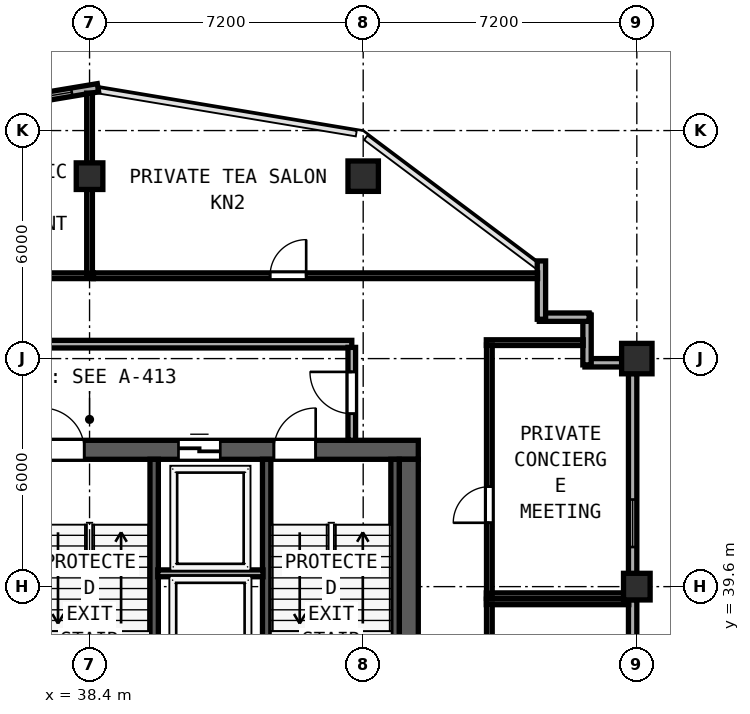
"""IFC4 building model, lengths in metres.
Left out: names, types, materials, properties, quantities, classifications, styles, units other than length and angle.
Written with IfcOpenShell. Run it as: python <this file> out.ifc"""

import sys

from ifc_helpers import new_model, si_unit, direction, frame, frame_2d, origin, origin_2d, place, context, subcontext, project, spatial, rectangle, hollow_rectangle, extrude, element, fill, save


model = new_model("IFC4")
c1 = context("Model", 3, precision=1e-05, world=origin(), true_north=direction((0.0, 1.0)))
c2 = subcontext(c1, "Body", "Model", "MODEL_VIEW")
j1 = project(units=[si_unit("LENGTHUNIT", "METRE"), si_unit("PLANEANGLEUNIT", "RADIAN")], contexts=[c1])
p1 = place(None, origin())
s1 = spatial("IfcSite", under=j1, at=p1, CompositionType="ELEMENT")
p2 = place(p1, origin())
s2 = spatial("IfcBuilding", under=s1, at=p2, CompositionType="ELEMENT")
p3 = place(p2, frame((0.0, 0.0, 246.75)))
s3 = spatial("IfcBuildingStorey", under=s2, at=p3, CompositionType="ELEMENT", Elevation=246.75)
p4 = place(p3, frame((29.75, 43.2, 0.0), z_axis=(0.0, 0.0, 1.0), x_axis=(1.0, 0.0, 0.0)))
e1 = element("IfcWall", 1, at=p4, inside=s3, PredefinedType="SHEAR", context=c2, shape_type="SweptSolid", body=[
    extrude(rectangle(XDim=17.3, YDim=0.5, at=frame_2d((8.65, 0.0))), origin(), (0.0, 0.0, 1.0), 3.67),
])
p5 = place(p4, frame((2.3, 0.0, 0.0)))
e2 = element("IfcOpeningElement", 2, at=p5, cuts=e1, PredefinedType="OPENING", context=c2, shape_type="SweptSolid", body=[
    extrude(rectangle(XDim=1.1, YDim=2.15, at=frame_2d((0.55, 1.075))), frame((0.0, 0.26, 0.0), z_axis=(0.0, -1.0, 0.0), x_axis=(1.0, 0.0, 0.0)), (0.0, 0.0, 1.0), 0.52),
])
p6 = place(p4, frame((7.41, 0.0, 0.0)))
e3 = element("IfcOpeningElement", 3, at=p6, cuts=e1, PredefinedType="OPENING", context=c2, shape_type="SweptSolid", body=[
    extrude(rectangle(XDim=1.1, YDim=2.15, at=frame_2d((0.55, 1.075))), frame((0.0, 0.26, 0.0), z_axis=(0.0, -1.0, 0.0), x_axis=(1.0, 0.0, 0.0)), (0.0, 0.0, 1.0), 0.52),
])
p7 = place(p4, frame((13.5, 0.0, 0.0)))
e4 = element("IfcOpeningElement", 4, at=p7, cuts=e1, PredefinedType="OPENING", context=c2, shape_type="SweptSolid", body=[
    extrude(rectangle(XDim=1.1, YDim=2.15, at=frame_2d((0.55, 1.075))), frame((0.0, 0.26, 0.0), z_axis=(0.0, -1.0, 0.0), x_axis=(1.0, 0.0, 0.0)), (0.0, 0.0, 1.0), 0.52),
])
p8 = place(p4, frame((4.63, 0.0, 0.0)))
e5 = element("IfcOpeningElement", 5, at=p8, cuts=e1, PredefinedType="OPENING", context=c2, shape_type="SweptSolid", body=[
    extrude(rectangle(XDim=1.1, YDim=2.2, at=frame_2d((0.55, 1.1))), frame((0.0, 0.26, 0.0), z_axis=(0.0, -1.0, 0.0), x_axis=(1.0, 0.0, 0.0)), (0.0, 0.0, 1.0), 0.52),
])
p9 = place(p4, frame((10.99, 0.0, 0.0)))
e6 = element("IfcOpeningElement", 6, at=p9, cuts=e1, PredefinedType="OPENING", context=c2, shape_type="SweptSolid", body=[
    extrude(rectangle(XDim=1.1, YDim=2.2, at=frame_2d((0.55, 1.1))), frame((0.0, 0.26, 0.0), z_axis=(0.0, -1.0, 0.0), x_axis=(1.0, 0.0, 0.0)), (0.0, 0.0, 1.0), 0.52),
])
p10 = place(p3, frame((46.8, 32.8, 0.0), z_axis=(0.0, 0.0, 1.0), x_axis=(0.0, 1.0, 0.0)))
e7 = element("IfcWall", 7, at=p10, inside=s3, PredefinedType="SHEAR", context=c2, shape_type="SweptSolid", body=[
    extrude(rectangle(XDim=10.15, YDim=0.5, at=frame_2d((5.075, 0.0))), origin(), (0.0, 0.0, 1.0), 3.67),
])
for number, where, z_axis, x_axis in (
    (8, (40.1, 35.39, 0.0), (0.0, 0.0, 1.0), (0.0, 1.0, 0.0)),
    (9, (43.06, 35.39, 0.0), (0.0, 0.0, 1.0), (0.0, 1.0, 0.0)),
    (10, (46.438, 35.39, 0.0), (0.0, 0.0, 1.0), (0.0, 1.0, 0.0)),
):
    element("IfcWall", number, at=place(p3, frame(where, z_axis=z_axis, x_axis=x_axis)), inside=s3, PredefinedType="SHEAR", context=c2, shape_type="SweptSolid", body=[
        extrude(rectangle(XDim=7.56, YDim=0.22, at=frame_2d((3.78, 0.0))), origin(), (0.0, 0.0, 1.0), 3.67),
    ])
for number, where, z_axis, x_axis in (
    (11, (52.8, 45.6, 0.0), (0.0, 0.0, 1.0), (1.0, 0.0, 0.0)),
    (12, (45.6, 50.4, 0.0), (0.0, 0.0, 1.0), (1.0, 0.0, 0.0)),
):
    element("IfcColumn", number, at=place(p3, frame(where, z_axis=z_axis, x_axis=x_axis)), inside=s3, PredefinedType="COLUMN", context=c2, shape_type="SweptSolid", body=[
        extrude(hollow_rectangle(XDim=0.8, YDim=0.8, WallThickness=0.03, at=origin_2d()), origin(), (0.0, 0.0, 1.0), 3.85),
    ])
for number, where, z_axis, x_axis in (
    (13, (52.8, 39.6, 0.0), (0.0, 0.0, 1.0), (1.0, 0.0, 0.0)),
    (14, (38.4, 50.4, 0.0), (0.0, 0.0, 1.0), (1.0, 0.0, 0.0)),
):
    element("IfcColumn", number, at=place(p3, frame(where, z_axis=z_axis, x_axis=x_axis)), inside=s3, PredefinedType="COLUMN", context=c2, shape_type="SweptSolid", body=[
        extrude(hollow_rectangle(XDim=0.7, YDim=0.7, WallThickness=0.026, at=origin_2d()), origin(), (0.0, 0.0, 1.0), 3.85),
    ])
p11 = place(p3, frame((52.69, 33.992, 0.0), z_axis=(0.0, 0.0, 1.0), x_axis=(0.0, 1.0, 0.0)))
e15 = element("IfcWall", 15, at=p11, inside=s3, PredefinedType="SOLIDWALL", context=c2, shape_type="SweptSolid", body=[
    extrude(rectangle(XDim=5.266, YDim=0.22, at=frame_2d((2.633, 0.0))), origin(), (0.0, 0.0, 1.0), 3.315),
])
p12 = place(p11, frame((0.7, 0.0, 0.85)))
e16 = element("IfcOpeningElement", 16, at=p12, cuts=e15, PredefinedType="OPENING", context=c2, shape_type="SweptSolid", body=[
    extrude(rectangle(XDim=1.25, YDim=1.95, at=frame_2d((0.625, 0.975))), frame((0.0, 0.12, 0.0), z_axis=(0.0, -1.0, 0.0), x_axis=(1.0, 0.0, 0.0)), (0.0, 0.0, 1.0), 0.24),
])
p13 = place(p3, frame((52.69, 39.942, 0.0), z_axis=(0.0, 0.0, 1.0), x_axis=(0.0, 1.0, 0.0)))
e17 = element("IfcWall", 17, at=p13, inside=s3, PredefinedType="SOLIDWALL", context=c2, shape_type="SweptSolid", body=[
    extrude(rectangle(XDim=5.266, YDim=0.22, at=frame_2d((2.633, 0.0))), origin(), (0.0, 0.0, 1.0), 3.315),
])
p14 = place(p13, frame((0.7, 0.0, 0.85)))
e18 = element("IfcOpeningElement", 18, at=p14, cuts=e17, PredefinedType="OPENING", context=c2, shape_type="SweptSolid", body=[
    extrude(rectangle(XDim=1.25, YDim=1.95, at=frame_2d((0.625, 0.975))), frame((0.0, 0.12, 0.0), z_axis=(0.0, -1.0, 0.0), x_axis=(1.0, 0.0, 0.0)), (0.0, 0.0, 1.0), 0.24),
])
p15 = place(p3, frame((52.408, 45.49, 0.0), z_axis=(0.0, 0.0, 1.0), x_axis=(-1.0, 0.0, 0.0)))
e19 = element("IfcWall", 19, at=p15, inside=s3, PredefinedType="SOLIDWALL", context=c2, shape_type="SweptSolid", body=[
    extrude(rectangle(XDim=0.973, YDim=0.22, at=frame_2d((0.486, 0.0))), origin(), (0.0, 0.0, 1.0), 3.67),
])
p16 = place(p3, frame((51.49, 45.435, 0.0), z_axis=(0.0, 0.0, 1.0), x_axis=(0.0, 1.0, 0.0)))
e20 = element("IfcWall", 20, at=p16, inside=s3, PredefinedType="SOLIDWALL", context=c2, shape_type="SweptSolid", body=[
    extrude(rectangle(XDim=1.31, YDim=0.22, at=frame_2d((0.655, 0.0))), origin(), (0.0, 0.0, 1.0), 3.67),
])
p17 = place(p3, frame((51.545, 46.69, 0.0), z_axis=(0.0, 0.0, 1.0), x_axis=(-1.0, 0.0, 0.0)))
e21 = element("IfcWall", 21, at=p17, inside=s3, PredefinedType="SOLIDWALL", context=c2, shape_type="SweptSolid", body=[
    extrude(rectangle(XDim=1.31, YDim=0.22, at=frame_2d((0.655, 0.0))), origin(), (0.0, 0.0, 1.0), 3.67),
])
p18 = place(p3, frame((50.29, 46.635, 0.0), z_axis=(0.0, 0.0, 1.0), x_axis=(0.0, 1.0, 0.0)))
e22 = element("IfcWall", 22, at=p18, inside=s3, PredefinedType="SOLIDWALL", context=c2, shape_type="SweptSolid", body=[
    extrude(rectangle(XDim=1.535, YDim=0.22, at=frame_2d((0.768, 0.0))), origin(), (0.0, 0.0, 1.0), 3.67),
])
p19 = place(p3, frame((38.622, 52.726, 0.0), z_axis=(0.0, 0.0, 1.0), x_axis=(-0.986390420428, -0.164420006349, 0.0)))
e23 = element("IfcWall", 23, at=p19, inside=s3, PredefinedType="SOLIDWALL", context=c2, shape_type="SweptSolid", body=[
    extrude(rectangle(XDim=7.534, YDim=0.22, at=frame_2d((3.767, 0.0))), origin(), (0.0, 0.0, 1.0), 3.67),
])
p20 = place(p19, frame((0.7, 0.0, 0.85)))
e24 = element("IfcOpeningElement", 24, at=p20, cuts=e23, PredefinedType="OPENING", context=c2, shape_type="SweptSolid", body=[
    extrude(rectangle(XDim=1.25, YDim=1.95, at=frame_2d((0.625, 0.975))), frame((0.0, 0.12, 0.0), z_axis=(0.0, -1.0, 0.0), x_axis=(1.0, 0.0, 0.0)), (0.0, 0.0, 1.0), 0.24),
])
p21 = place(p3, frame((31.5, 45.98, 0.0), z_axis=(0.0, 0.0, 1.0), x_axis=(1.0, 0.0, 0.0)))
e25 = element("IfcWall", 25, at=p21, inside=s3, PredefinedType="SOLIDWALL", context=c2, shape_type="SweptSolid", body=[
    extrude(rectangle(XDim=13.8, YDim=0.2, at=frame_2d((6.9, 0.0))), origin(), (0.0, 0.0, 1.0), 3.67),
])
p22 = place(p3, frame((45.3, 43.45, 0.0), z_axis=(0.0, 0.0, 1.0), x_axis=(0.0, 1.0, 0.0)))
e26 = element("IfcWall", 26, at=p22, inside=s3, PredefinedType="SOLIDWALL", context=c2, shape_type="SweptSolid", body=[
    extrude(rectangle(XDim=2.445, YDim=0.2, at=frame_2d((1.223, 0.0))), origin(), (0.0, 0.0, 1.0), 3.67),
])
p23 = place(p22, frame((0.7, 0.0, 0.0)))
e27 = element("IfcOpeningElement", 27, at=p23, cuts=e26, PredefinedType="OPENING", context=c2, shape_type="SweptSolid", body=[
    extrude(rectangle(XDim=1.1, YDim=2.15, at=frame_2d((0.55, 1.075))), frame((0.0, 0.11, 0.0), z_axis=(0.0, -1.0, 0.0), x_axis=(1.0, 0.0, 0.0)), (0.0, 0.0, 1.0), 0.22),
])
p24 = place(p3, frame((40.195, 39.95, 0.0), z_axis=(0.0, 0.0, 1.0), x_axis=(1.0, 0.0, 0.0)))
e28 = element("IfcWall", 28, at=p24, inside=s3, PredefinedType="SOLIDWALL", context=c2, shape_type="SweptSolid", body=[
    extrude(rectangle(XDim=2.77, YDim=0.18, at=frame_2d((1.385, 0.0))), origin(), (0.0, 0.0, 1.0), 3.67),
])
p25 = place(p3, frame((48.84, 39.2, 0.0), z_axis=(0.0, 0.0, 1.0), x_axis=(1.0, 0.0, 0.0)))
e29 = element("IfcWall", 29, at=p25, inside=s3, PredefinedType="PARTITIONING", context=c2, shape_type="SweptSolid", body=[
    extrude(rectangle(XDim=3.748, YDim=0.15, at=frame_2d((1.874, 0.0))), origin(), (0.0, 0.0, 1.0), 3.67),
])
p26 = place(p3, frame((48.92, 33.06, 0.0), z_axis=(0.0, 0.0, 1.0), x_axis=(0.0, 1.0, 0.0)))
e30 = element("IfcWall", 30, at=p26, inside=s3, PredefinedType="PARTITIONING", context=c2, shape_type="SweptSolid", body=[
    extrude(rectangle(XDim=6.08, YDim=0.15, at=frame_2d((3.04, 0.0))), origin(), (0.0, 0.0, 1.0), 3.67),
])
p27 = place(p26, frame((1.66, 0.0, 0.0)))
e31 = element("IfcOpeningElement", 31, at=p27, cuts=e30, PredefinedType="OPENING", context=c2, shape_type="SweptSolid", body=[
    extrude(rectangle(XDim=0.95, YDim=2.12, at=frame_2d((0.475, 1.06))), frame((0.0, 0.085, 0.0), z_axis=(0.0, -1.0, 0.0), x_axis=(1.0, 0.0, 0.0)), (0.0, 0.0, 1.0), 0.17),
])
p28 = place(p3, frame((48.84, 46.02, 0.0), z_axis=(0.0, 0.0, 1.0), x_axis=(1.0, 0.0, 0.0)))
e32 = element("IfcWall", 32, at=p28, inside=s3, PredefinedType="PARTITIONING", context=c2, shape_type="SweptSolid", body=[
    extrude(rectangle(XDim=2.548, YDim=0.15, at=frame_2d((1.274, 0.0))), origin(), (0.0, 0.0, 1.0), 3.67),
])
p29 = place(p3, frame((48.84, 39.36, 0.0), z_axis=(0.0, 0.0, 1.0), x_axis=(1.0, 0.0, 0.0)))
e33 = element("IfcWall", 33, at=p29, inside=s3, PredefinedType="PARTITIONING", context=c2, shape_type="SweptSolid", body=[
    extrude(rectangle(XDim=3.748, YDim=0.15, at=frame_2d((1.874, 0.0))), origin(), (0.0, 0.0, 1.0), 3.67),
])
p30 = place(p3, frame((48.92, 39.42, 0.0), z_axis=(0.0, 0.0, 1.0), x_axis=(0.0, 1.0, 0.0)))
e34 = element("IfcWall", 34, at=p30, inside=s3, PredefinedType="PARTITIONING", context=c2, shape_type="SweptSolid", body=[
    extrude(rectangle(XDim=6.54, YDim=0.15, at=frame_2d((3.27, 0.0))), origin(), (0.0, 0.0, 1.0), 3.67),
])
p31 = place(p30, frame((1.86, 0.0, 0.0)))
e35 = element("IfcOpeningElement", 35, at=p31, cuts=e34, PredefinedType="OPENING", context=c2, shape_type="SweptSolid", body=[
    extrude(rectangle(XDim=0.95, YDim=2.12, at=frame_2d((0.475, 1.06))), frame((0.0, 0.085, 0.0), z_axis=(0.0, -1.0, 0.0), x_axis=(1.0, 0.0, 0.0)), (0.0, 0.0, 1.0), 0.17),
])
p32 = place(p3, frame((26.612, 47.78, 0.0), z_axis=(0.0, 0.0, 1.0), x_axis=(1.0, 0.0, 0.0)))
e36 = element("IfcWall", 36, at=p32, inside=s3, PredefinedType="PARTITIONING", context=c2, shape_type="SweptSolid", body=[
    extrude(rectangle(XDim=11.888, YDim=0.15, at=frame_2d((5.944, 0.0))), origin(), (0.0, 0.0, 1.0), 3.67),
])
p33 = place(p32, frame((1.42, 0.0, 0.0)))
e37 = element("IfcOpeningElement", 37, at=p33, cuts=e36, PredefinedType="OPENING", context=c2, shape_type="SweptSolid", body=[
    extrude(rectangle(XDim=0.95, YDim=2.18, at=frame_2d((0.475, 1.09))), frame((0.0, 0.085, 0.0), z_axis=(0.0, -1.0, 0.0), x_axis=(1.0, 0.0, 0.0)), (0.0, 0.0, 1.0), 0.17),
])
p34 = place(p3, frame((38.4, 47.84, 0.0), z_axis=(0.0, 0.0, 1.0), x_axis=(0.0, 1.0, 0.0)))
e38 = element("IfcWall", 38, at=p34, inside=s3, PredefinedType="PARTITIONING", context=c2, shape_type="SweptSolid", body=[
    extrude(rectangle(XDim=4.745, YDim=0.15, at=frame_2d((2.373, 0.0))), origin(), (0.0, 0.0, 1.0), 3.67),
])
p35 = place(p3, frame((38.502, 47.78, 0.0), z_axis=(0.0, 0.0, 1.0), x_axis=(1.0, 0.0, 0.0)))
e39 = element("IfcWall", 39, at=p35, inside=s3, PredefinedType="PARTITIONING", context=c2, shape_type="SweptSolid", body=[
    extrude(rectangle(XDim=11.686, YDim=0.15, at=frame_2d((5.843, 0.0))), origin(), (0.0, 0.0, 1.0), 3.67),
])
p36 = place(p35, frame((4.648, 0.0, 0.0)))
e40 = element("IfcOpeningElement", 40, at=p36, cuts=e39, PredefinedType="OPENING", context=c2, shape_type="SweptSolid", body=[
    extrude(rectangle(XDim=0.95, YDim=2.12, at=frame_2d((0.475, 1.06))), frame((0.0, 0.085, 0.0), z_axis=(0.0, -1.0, 0.0), x_axis=(1.0, 0.0, 0.0)), (0.0, 0.0, 1.0), 0.17),
])
p37 = place(p14, origin())
e41 = element("IfcWindow", 41, at=p37, inside=s3, PartitioningType="SINGLE_PANEL", PredefinedType="WINDOW", context=c2, shape_type="SweptSolid", body=[
    extrude(rectangle(XDim=1.25, YDim=1.95, at=frame_2d((0.625, 0.975))), frame((0.0, 0.03, 0.0), z_axis=(0.0, -1.0, 0.0), x_axis=(1.0, 0.0, 0.0)), (0.0, 0.0, 1.0), 0.06),
])
fill(e18, e41)
p38 = place(p20, origin())
e42 = element("IfcWindow", 42, at=p38, inside=s3, PartitioningType="SINGLE_PANEL", PredefinedType="WINDOW", context=c2, shape_type="SweptSolid", body=[
    extrude(rectangle(XDim=1.25, YDim=1.95, at=frame_2d((0.625, 0.975))), frame((0.0, 0.03, 0.0), z_axis=(0.0, -1.0, 0.0), x_axis=(1.0, 0.0, 0.0)), (0.0, 0.0, 1.0), 0.06),
])
fill(e24, e42)
p39 = place(p6, origin())
e43 = element("IfcDoor", 43, at=p39, inside=s3, OperationType="SINGLE_SWING_LEFT", PredefinedType="DOOR", context=c2, shape_type="SweptSolid", body=[
    extrude(rectangle(XDim=1.1, YDim=2.15, at=frame_2d((0.55, 1.075))), frame((0.0, 0.185, 0.0), z_axis=(0.0, -1.0, 0.0), x_axis=(1.0, 0.0, 0.0)), (0.0, 0.0, 1.0), 0.05),
])
fill(e3, e43)
p40 = place(p7, origin())
e44 = element("IfcDoor", 44, at=p40, inside=s3, OperationType="SINGLE_SWING_RIGHT", PredefinedType="DOOR", context=c2, shape_type="SweptSolid", body=[
    extrude(rectangle(XDim=1.1, YDim=2.15, at=frame_2d((0.55, 1.075))), frame((0.0, 0.185, 0.0), z_axis=(0.0, -1.0, 0.0), x_axis=(1.0, 0.0, 0.0)), (0.0, 0.0, 1.0), 0.05),
])
fill(e4, e44)
p41 = place(p23, origin())
e45 = element("IfcDoor", 45, at=p41, inside=s3, OperationType="SINGLE_SWING_RIGHT", PredefinedType="DOOR", context=c2, shape_type="SweptSolid", body=[
    extrude(rectangle(XDim=1.1, YDim=2.15, at=frame_2d((0.55, 1.075))), frame((0.0, 0.025, 0.0), z_axis=(0.0, -1.0, 0.0), x_axis=(1.0, 0.0, 0.0)), (0.0, 0.0, 1.0), 0.05),
])
fill(e27, e45)
p42 = place(p9, origin())
e46 = element("IfcDoor", 46, at=p42, inside=s3, OperationType="SLIDING_TO_LEFT", PredefinedType="DOOR", context=c2, shape_type="SweptSolid", body=[
    extrude(rectangle(XDim=1.1, YDim=2.2, at=frame_2d((0.55, 1.1))), frame((0.0, 0.185, 0.0), z_axis=(0.0, -1.0, 0.0), x_axis=(1.0, 0.0, 0.0)), (0.0, 0.0, 1.0), 0.05),
])
fill(e6, e46)
p43 = place(p31, origin())
e47 = element("IfcDoor", 47, at=p43, inside=s3, OperationType="SINGLE_SWING_LEFT", PredefinedType="DOOR", context=c2, shape_type="SweptSolid", body=[
    extrude(rectangle(XDim=0.95, YDim=2.12, at=frame_2d((0.475, 1.06))), frame((0.0, 0.025, 0.0), z_axis=(0.0, -1.0, 0.0), x_axis=(1.0, 0.0, 0.0)), (0.0, 0.0, 1.0), 0.05),
])
fill(e35, e47)
p44 = place(p36, origin())
e48 = element("IfcDoor", 48, at=p44, inside=s3, OperationType="SINGLE_SWING_RIGHT", PredefinedType="DOOR", context=c2, shape_type="SweptSolid", body=[
    extrude(rectangle(XDim=0.95, YDim=2.12, at=frame_2d((0.475, 1.06))), frame((0.0, 0.025, 0.0), z_axis=(0.0, -1.0, 0.0), x_axis=(1.0, 0.0, 0.0)), (0.0, 0.0, 1.0), 0.05),
])
fill(e40, e48)
save(model, sys.argv[1])
